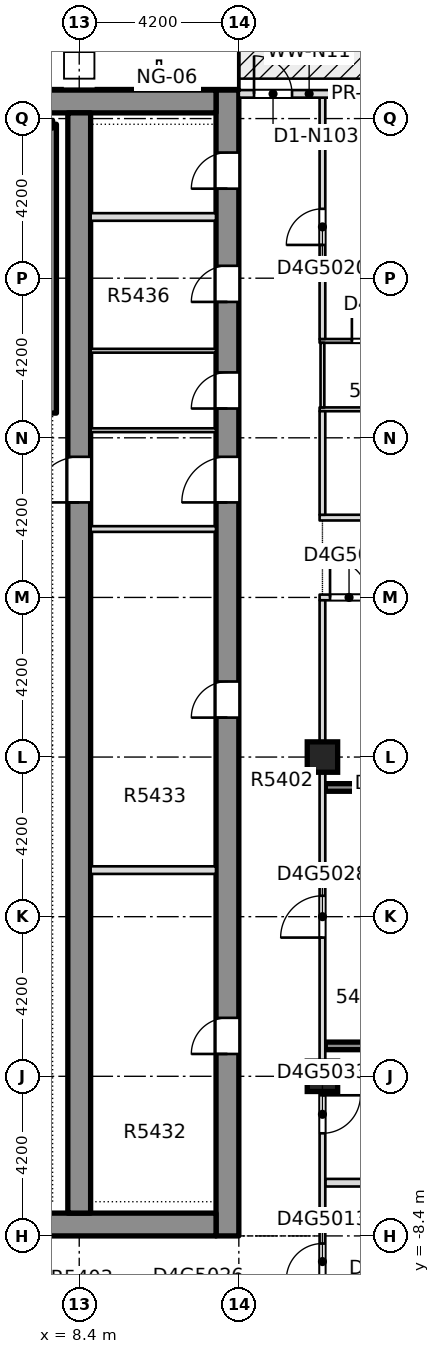
"""IFC4 building model, lengths in metres.
Left out: names, types, materials, properties, quantities, classifications, styles, units other than length and angle.
Written with IfcOpenShell. Run it as: python <this file> out.ifc"""

import sys

from ifc_helpers import new_model, si_unit, direction, frame, frame_2d, origin, origin_2d, place, context, subcontext, project, spatial, rectangle, extrude, element, fill, save


model = new_model("IFC4")
c1 = context("Model", 3, precision=1e-05, world=origin(), true_north=direction((0.0, 1.0)))
c2 = subcontext(c1, "Body", "Model", "MODEL_VIEW")
j1 = project(units=[si_unit("LENGTHUNIT", "METRE"), si_unit("PLANEANGLEUNIT", "RADIAN")], contexts=[c1])
p1 = place(None, origin())
s1 = spatial("IfcSite", under=j1, at=p1, CompositionType="ELEMENT")
p2 = place(p1, origin())
s2 = spatial("IfcBuilding", under=s1, at=p2, CompositionType="ELEMENT")
p3 = place(p2, frame((0.0, 0.0, 206.6)))
s3 = spatial("IfcBuildingStorey", under=s2, at=p3, CompositionType="ELEMENT", Elevation=206.6)
p4 = place(p3, frame((12.3, -8.4, -0.4), z_axis=(0.0, 0.0, 1.0), x_axis=(0.0, 1.0, 0.0)))
e1 = element("IfcWall", 1, at=p4, inside=s3, PredefinedType="SHEAR", context=c2, shape_type="SweptSolid", body=[
    extrude(rectangle(XDim=30.15, YDim=0.6, at=frame_2d((15.075, 0.0))), origin(), (0.0, 0.0, 1.0), 3.45),
])
p5 = place(p4, frame((4.788, 0.0, 0.4)))
e2 = element("IfcOpeningElement", 2, at=p5, cuts=e1, PredefinedType="OPENING", context=c2, shape_type="SweptSolid", body=[
    extrude(rectangle(XDim=0.95, YDim=2.1, at=frame_2d((0.475, 1.05))), frame((0.0, 0.31, 0.0), z_axis=(0.0, -1.0, 0.0), x_axis=(1.0, 0.0, 0.0)), (0.0, 0.0, 1.0), 0.62),
])
p6 = place(p4, frame((13.638, 0.0, 0.4)))
e3 = element("IfcOpeningElement", 3, at=p6, cuts=e1, PredefinedType="OPENING", context=c2, shape_type="SweptSolid", body=[
    extrude(rectangle(XDim=0.95, YDim=2.1, at=frame_2d((0.475, 1.05))), frame((0.0, 0.31, 0.0), z_axis=(0.0, -1.0, 0.0), x_axis=(1.0, 0.0, 0.0)), (0.0, 0.0, 1.0), 0.62),
])
p7 = place(p4, frame((21.771, 0.0, 0.4)))
e4 = element("IfcOpeningElement", 4, at=p7, cuts=e1, PredefinedType="OPENING", context=c2, shape_type="SweptSolid", body=[
    extrude(rectangle(XDim=0.95, YDim=2.1, at=frame_2d((0.475, 1.05))), frame((0.0, 0.31, 0.0), z_axis=(0.0, -1.0, 0.0), x_axis=(1.0, 0.0, 0.0)), (0.0, 0.0, 1.0), 0.62),
])
p8 = place(p4, frame((24.576, 0.0, 0.4)))
e5 = element("IfcOpeningElement", 5, at=p8, cuts=e1, PredefinedType="OPENING", context=c2, shape_type="SweptSolid", body=[
    extrude(rectangle(XDim=0.95, YDim=2.1, at=frame_2d((0.475, 1.05))), frame((0.0, 0.31, 0.0), z_axis=(0.0, -1.0, 0.0), x_axis=(1.0, 0.0, 0.0)), (0.0, 0.0, 1.0), 0.62),
])
p9 = place(p4, frame((27.555, 0.0, 0.4)))
e6 = element("IfcOpeningElement", 6, at=p9, cuts=e1, PredefinedType="OPENING", context=c2, shape_type="SweptSolid", body=[
    extrude(rectangle(XDim=0.95, YDim=2.1, at=frame_2d((0.475, 1.05))), frame((0.0, 0.31, 0.0), z_axis=(0.0, -1.0, 0.0), x_axis=(1.0, 0.0, 0.0)), (0.0, 0.0, 1.0), 0.62),
])
p10 = place(p4, frame((19.3, 0.0, 0.4)))
e7 = element("IfcOpeningElement", 7, at=p10, cuts=e1, PredefinedType="OPENING", context=c2, shape_type="SweptSolid", body=[
    extrude(rectangle(XDim=1.2, YDim=2.1, at=frame_2d((0.6, 1.05))), frame((0.0, 0.31, 0.0), z_axis=(0.0, -1.0, 0.0), x_axis=(1.0, 0.0, 0.0)), (0.0, 0.0, 1.0), 0.62),
])
p11 = place(p3, frame((-12.0, -8.1, -0.4), z_axis=(0.0, 0.0, 1.0), x_axis=(1.0, 0.0, 0.0)))
e8 = element("IfcWall", 8, at=p11, inside=s3, PredefinedType="SHEAR", context=c2, shape_type="SweptSolid", body=[
    extrude(rectangle(XDim=24.0, YDim=0.6, at=frame_2d((12.0, 0.0))), origin(), (0.0, 0.0, 1.0), 3.45),
])
p12 = place(p11, frame((7.25, 0.0, 0.4)))
e9 = element("IfcOpeningElement", 9, at=p12, cuts=e8, PredefinedType="OPENING", context=c2, shape_type="SweptSolid", body=[
    extrude(rectangle(XDim=1.8, YDim=2.1, at=frame_2d((0.9, 1.05))), frame((0.0, 0.31, 0.0), z_axis=(0.0, -1.0, 0.0), x_axis=(1.0, 0.0, 0.0)), (0.0, 0.0, 1.0), 0.62),
])
p13 = place(p11, frame((14.95, 0.0, 0.4)))
e10 = element("IfcOpeningElement", 10, at=p13, cuts=e8, PredefinedType="OPENING", context=c2, shape_type="SweptSolid", body=[
    extrude(rectangle(XDim=1.8, YDim=2.1, at=frame_2d((0.9, 1.05))), frame((0.0, 0.31, 0.0), z_axis=(0.0, -1.0, 0.0), x_axis=(1.0, 0.0, 0.0)), (0.0, 0.0, 1.0), 0.62),
])
p14 = place(p3, frame((-12.0, 21.45, -0.4), z_axis=(0.0, 0.0, 1.0), x_axis=(1.0, 0.0, 0.0)))
e11 = element("IfcWall", 11, at=p14, inside=s3, PredefinedType="SHEAR", context=c2, shape_type="SweptSolid", body=[
    extrude(rectangle(XDim=24.0, YDim=0.6, at=frame_2d((12.0, 0.0))), origin(), (0.0, 0.0, 1.0), 3.45),
])
p15 = place(p3, frame((8.4, -7.8, -0.4), z_axis=(0.0, 0.0, 1.0), x_axis=(0.0, 1.0, 0.0)))
e12 = element("IfcWall", 12, at=p15, inside=s3, PredefinedType="SHEAR", context=c2, shape_type="SweptSolid", body=[
    extrude(rectangle(XDim=28.95, YDim=0.6, at=frame_2d((14.475, 0.0))), origin(), (0.0, 0.0, 1.0), 3.45),
])
p16 = place(p15, frame((18.7, 0.0, 0.4)))
e13 = element("IfcOpeningElement", 13, at=p16, cuts=e12, PredefinedType="OPENING", context=c2, shape_type="SweptSolid", body=[
    extrude(rectangle(XDim=1.2, YDim=2.1, at=frame_2d((0.6, 1.05))), frame((0.0, 0.31, 0.0), z_axis=(0.0, -1.0, 0.0), x_axis=(1.0, 0.0, 0.0)), (0.0, 0.0, 1.0), 0.62),
])
for number, where, z_axis, x_axis in (
    (14, (14.8, -4.2, -0.4), (0.0, 0.0, 1.0), (1.0, 0.0, 0.0)),
    (15, (14.8, 4.2, -0.4), (0.0, 0.0, 1.0), (1.0, 0.0, 0.0)),
):
    element("IfcColumn", number, at=place(p3, frame(where, z_axis=z_axis, x_axis=x_axis)), inside=s3, PredefinedType="COLUMN", context=c2, shape_type="SweptSolid", body=[
        extrude(rectangle(XDim=0.8, YDim=0.8, at=origin_2d()), origin(), (0.0, 0.0, 1.0), 3.45),
    ])
p17 = place(p3, frame((14.875, -7.0, 0.0), z_axis=(0.0, 0.0, 1.0), x_axis=(1.0, 0.0, 0.0)))
e16 = element("IfcWall", 16, at=p17, inside=s3, PredefinedType="PARTITIONING", context=c2, shape_type="SweptSolid", body=[
    extrude(rectangle(XDim=10.875, YDim=0.2, at=frame_2d((5.438, 0.0))), origin(), (0.0, 0.0, 1.0), 3.05),
])
p18 = place(p3, frame((14.875, -3.4, 0.0), z_axis=(0.0, 0.0, 1.0), x_axis=(1.0, 0.0, 0.0)))
e17 = element("IfcWall", 17, at=p18, inside=s3, PredefinedType="SOLIDWALL", context=c2, shape_type="SweptSolid", body=[
    extrude(rectangle(XDim=5.525, YDim=0.2, at=frame_2d((2.762, 0.0))), origin(), (0.0, 0.0, 1.0), 3.05),
])
p19 = place(p3, frame((14.725, 8.4, 0.0), z_axis=(0.0, 0.0, 1.0), x_axis=(1.0, 0.0, 0.0)))
e18 = element("IfcWall", 18, at=p19, inside=s3, PredefinedType="PARTITIONING", context=c2, shape_type="SweptSolid", body=[
    extrude(rectangle(XDim=11.025, YDim=0.15, at=frame_2d((5.512, 0.0))), origin(), (0.0, 0.0, 1.0), 3.05),
])
p20 = place(p19, frame((0.275, 0.0, 0.0)))
e19 = element("IfcOpeningElement", 19, at=p20, cuts=e18, PredefinedType="OPENING", context=c2, shape_type="SweptSolid", body=[
    extrude(rectangle(XDim=1.0, YDim=2.1, at=frame_2d((0.5, 1.05))), frame((0.0, 0.085, 0.0), z_axis=(0.0, -1.0, 0.0), x_axis=(1.0, 0.0, 0.0)), (0.0, 0.0, 1.0), 0.17),
])
p21 = place(p3, frame((14.725, 10.5, 0.0), z_axis=(0.0, 0.0, 1.0), x_axis=(1.0, 0.0, 0.0)))
e20 = element("IfcWall", 20, at=p21, inside=s3, PredefinedType="PARTITIONING", context=c2, shape_type="SweptSolid", body=[
    extrude(rectangle(XDim=11.025, YDim=0.15, at=frame_2d((5.512, 0.0))), origin(), (0.0, 0.0, 1.0), 3.05),
])
p22 = place(p21, frame((5.15, 0.0, 0.0)))
e21 = element("IfcOpeningElement", 21, at=p22, cuts=e20, PredefinedType="OPENING", context=c2, shape_type="SweptSolid", body=[
    extrude(rectangle(XDim=1.0, YDim=2.1, at=frame_2d((0.5, 1.05))), frame((0.0, 0.085, 0.0), z_axis=(0.0, -1.0, 0.0), x_axis=(1.0, 0.0, 0.0)), (0.0, 0.0, 1.0), 0.17),
])
p23 = place(p3, frame((14.725, 13.35, 0.0), z_axis=(0.0, 0.0, 1.0), x_axis=(1.0, 0.0, 0.0)))
e22 = element("IfcWall", 22, at=p23, inside=s3, PredefinedType="PARTITIONING", context=c2, shape_type="SweptSolid", body=[
    extrude(rectangle(XDim=2.525, YDim=0.1, at=frame_2d((1.262, 0.0))), origin(), (0.0, 0.0, 1.0), 3.05),
])
p24 = place(p3, frame((14.725, 15.15, 0.0), z_axis=(0.0, 0.0, 1.0), x_axis=(1.0, 0.0, 0.0)))
e23 = element("IfcWall", 23, at=p24, inside=s3, PredefinedType="PARTITIONING", context=c2, shape_type="SweptSolid", body=[
    extrude(rectangle(XDim=2.525, YDim=0.1, at=frame_2d((1.262, 0.0))), origin(), (0.0, 0.0, 1.0), 3.05),
])
p25 = place(p24, frame((0.85, 0.0, 0.0)))
e24 = element("IfcOpeningElement", 24, at=p25, cuts=e23, PredefinedType="OPENING", context=c2, shape_type="SweptSolid", body=[
    extrude(rectangle(XDim=0.85, YDim=2.1, at=frame_2d((0.425, 1.05))), frame((0.0, 0.06, 0.0), z_axis=(0.0, -1.0, 0.0), x_axis=(1.0, 0.0, 0.0)), (0.0, 0.0, 1.0), 0.12),
])
p26 = place(p3, frame((14.8, -10.18, 0.0), z_axis=(0.0, 0.0, 1.0), x_axis=(0.0, 1.0, 0.0)))
e25 = element("IfcWall", 25, at=p26, inside=s3, PredefinedType="PARTITIONING", context=c2, shape_type="SweptSolid", body=[
    extrude(rectangle(XDim=18.505, YDim=0.15, at=frame_2d((9.252, 0.0))), origin(), (0.0, 0.0, 1.0), 3.05),
])
p27 = place(p26, frame((0.63, 0.0, 0.0)))
e26 = element("IfcOpeningElement", 26, at=p27, cuts=e25, PredefinedType="OPENING", context=c2, shape_type="SweptSolid", body=[
    extrude(rectangle(XDim=0.95, YDim=2.1, at=frame_2d((0.475, 1.05))), frame((0.0, 0.085, 0.0), z_axis=(0.0, -1.0, 0.0), x_axis=(1.0, 0.0, 0.0)), (0.0, 0.0, 1.0), 0.17),
])
p28 = place(p26, frame((9.63, 0.0, 0.0)))
e27 = element("IfcOpeningElement", 27, at=p28, cuts=e25, PredefinedType="OPENING", context=c2, shape_type="SweptSolid", body=[
    extrude(rectangle(XDim=1.1, YDim=2.1, at=frame_2d((0.55, 1.05))), frame((0.0, 0.085, 0.0), z_axis=(0.0, -1.0, 0.0), x_axis=(1.0, 0.0, 0.0)), (0.0, 0.0, 1.0), 0.17),
])
p29 = place(p26, frame((4.48, 0.0, 0.0)))
e28 = element("IfcOpeningElement", 28, at=p29, cuts=e25, PredefinedType="OPENING", context=c2, shape_type="SweptSolid", body=[
    extrude(rectangle(XDim=1.0, YDim=2.1, at=frame_2d((0.5, 1.05))), frame((0.0, 0.085, 0.0), z_axis=(0.0, -1.0, 0.0), x_axis=(1.0, 0.0, 0.0)), (0.0, 0.0, 1.0), 0.17),
])
p30 = place(p3, frame((14.8, 10.575, 0.0), z_axis=(0.0, 0.0, 1.0), x_axis=(0.0, 1.0, 0.0)))
e29 = element("IfcWall", 29, at=p30, inside=s3, PredefinedType="PARTITIONING", context=c2, shape_type="SweptSolid", body=[
    extrude(rectangle(XDim=2.725, YDim=0.15, at=frame_2d((1.363, 0.0))), origin(), (0.0, 0.0, 1.0), 3.05),
])
p31 = place(p3, frame((14.8, 13.4, 0.0), z_axis=(0.0, 0.0, 1.0), x_axis=(0.0, 1.0, 0.0)))
e30 = element("IfcWall", 30, at=p31, inside=s3, PredefinedType="PARTITIONING", context=c2, shape_type="SweptSolid", body=[
    extrude(rectangle(XDim=1.7, YDim=0.1, at=frame_2d((0.85, 0.0))), origin(), (0.0, 0.0, 1.0), 3.05),
])
p32 = place(p3, frame((14.8, 15.2, 0.0), z_axis=(0.0, 0.0, 1.0), x_axis=(0.0, 1.0, 0.0)))
e31 = element("IfcWall", 31, at=p32, inside=s3, PredefinedType="PARTITIONING", context=c2, shape_type="SweptSolid", body=[
    extrude(rectangle(XDim=6.35, YDim=0.15, at=frame_2d((3.175, 0.0))), origin(), (0.0, 0.0, 1.0), 3.05),
])
p33 = place(p32, frame((2.475, 0.0, 0.0)))
e32 = element("IfcOpeningElement", 32, at=p33, cuts=e31, PredefinedType="OPENING", context=c2, shape_type="SweptSolid", body=[
    extrude(rectangle(XDim=0.95, YDim=2.1, at=frame_2d((0.475, 1.05))), frame((0.0, 0.085, 0.0), z_axis=(0.0, -1.0, 0.0), x_axis=(1.0, 0.0, 0.0)), (0.0, 0.0, 1.0), 0.17),
])
p34 = place(p3, frame((16.3, 21.65, 0.0), z_axis=(0.0, 0.0, 1.0), x_axis=(-1.0, 0.0, 0.0)))
e33 = element("IfcWall", 33, at=p34, inside=s3, PredefinedType="STANDARD", context=c2, shape_type="SweptSolid", body=[
    extrude(rectangle(XDim=3.7, YDim=0.2, at=frame_2d((1.85, 0.0))), origin(), (0.0, 0.0, 1.0), 3.05),
])
p35 = place(p34, frame((2.3, 0.0, 0.0)))
e34 = element("IfcOpeningElement", 34, at=p35, cuts=e33, PredefinedType="OPENING", context=c2, shape_type="SweptSolid", body=[
    extrude(rectangle(XDim=1.0, YDim=2.4, at=frame_2d((0.5, 1.2))), frame((0.0, 0.11, 0.0), z_axis=(0.0, -1.0, 0.0), x_axis=(1.0, 0.0, 0.0)), (0.0, 0.0, 1.0), 0.22),
])
p36 = place(p3, frame((8.701, 1.225, 0.0), z_axis=(0.0, 0.0, 1.0), x_axis=(1.0, 0.0, 0.0)))
e35 = element("IfcWall", 35, at=p36, inside=s3, PredefinedType="PARTITIONING", context=c2, shape_type="SweptSolid", body=[
    extrude(rectangle(XDim=3.298, YDim=0.2, at=frame_2d((1.649, 0.0))), origin(), (0.0, 0.0, 1.0), 3.05),
])
p37 = place(p3, frame((8.701, 10.2, 0.0), z_axis=(0.0, 0.0, 1.0), x_axis=(1.0, 0.0, 0.0)))
e36 = element("IfcWall", 36, at=p37, inside=s3, PredefinedType="PARTITIONING", context=c2, shape_type="SweptSolid", body=[
    extrude(rectangle(XDim=3.298, YDim=0.15, at=frame_2d((1.649, 0.0))), origin(), (0.0, 0.0, 1.0), 3.05),
])
for number, where, z_axis, x_axis in (
    (37, (8.701, 12.8, 0.0), (0.0, 0.0, 1.0), (1.0, 0.0, 0.0)),
    (38, (8.701, 14.891, 0.0), (0.0, 0.0, 1.0), (1.0, 0.0, 0.0)),
):
    element("IfcWall", number, at=place(p3, frame(where, z_axis=z_axis, x_axis=x_axis)), inside=s3, PredefinedType="PARTITIONING", context=c2, shape_type="SweptSolid", body=[
        extrude(rectangle(XDim=3.298, YDim=0.1, at=frame_2d((1.649, 0.0))), origin(), (0.0, 0.0, 1.0), 3.05),
    ])
p38 = place(p3, frame((8.701, 18.411, 0.0), z_axis=(0.0, 0.0, 1.0), x_axis=(1.0, 0.0, 0.0)))
e39 = element("IfcWall", 39, at=p38, inside=s3, PredefinedType="PARTITIONING", context=c2, shape_type="SweptSolid", body=[
    extrude(rectangle(XDim=3.298, YDim=0.2, at=frame_2d((1.649, 0.0))), origin(), (0.0, 0.0, 1.0), 3.05),
])
p39 = place(p3, frame((7.7, 13.25, 0.0), z_axis=(0.0, 0.0, 1.0), x_axis=(0.0, 1.0, 0.0)))
e40 = element("IfcWall", 40, at=p39, inside=s3, PredefinedType="SOLIDWALL", context=c2, shape_type="SweptSolid", body=[
    extrude(rectangle(XDim=7.6, YDim=0.2, at=frame_2d((3.8, 0.0))), origin(), (0.0, 0.0, 1.0), 3.05),
])
p40 = place(p3, frame((14.875, 3.4, 0.0), z_axis=(0.0, 0.0, 1.0), x_axis=(1.0, 0.0, 0.0)))
e41 = element("IfcWall", 41, at=p40, inside=s3, PredefinedType="SOLIDWALL", context=c2, shape_type="SweptSolid", body=[
    extrude(rectangle(XDim=5.575, YDim=0.2, at=frame_2d((2.788, 0.0))), origin(), (0.0, 0.0, 1.0), 3.05),
])
p41 = place(p27, origin())
e42 = element("IfcDoor", 42, at=p41, inside=s3, OperationType="SINGLE_SWING_RIGHT", PredefinedType="DOOR", context=c2, shape_type="SweptSolid", body=[
    extrude(rectangle(XDim=0.95, YDim=2.1, at=frame_2d((0.475, 1.05))), frame((0.0, 0.025, 0.0), z_axis=(0.0, -1.0, 0.0), x_axis=(1.0, 0.0, 0.0)), (0.0, 0.0, 1.0), 0.05),
])
fill(e26, e42)
p42 = place(p20, origin())
e43 = element("IfcDoor", 43, at=p42, inside=s3, OperationType="SINGLE_SWING_RIGHT", PredefinedType="DOOR", context=c2, shape_type="SweptSolid", body=[
    extrude(rectangle(XDim=1.0, YDim=2.1, at=frame_2d((0.5, 1.05))), frame((0.0, 0.025, 0.0), z_axis=(0.0, -1.0, 0.0), x_axis=(1.0, 0.0, 0.0)), (0.0, 0.0, 1.0), 0.05),
])
fill(e19, e43)
p43 = place(p33, origin())
e44 = element("IfcDoor", 44, at=p43, inside=s3, OperationType="SINGLE_SWING_LEFT", PredefinedType="DOOR", context=c2, shape_type="SweptSolid", body=[
    extrude(rectangle(XDim=0.95, YDim=2.1, at=frame_2d((0.475, 1.05))), frame((0.0, 0.025, 0.0), z_axis=(0.0, -1.0, 0.0), x_axis=(1.0, 0.0, 0.0)), (0.0, 0.0, 1.0), 0.05),
])
fill(e32, e44)
p44 = place(p25, origin())
e45 = element("IfcDoor", 45, at=p44, inside=s3, OperationType="SINGLE_SWING_RIGHT", PredefinedType="DOOR", context=c2, shape_type="SweptSolid", body=[
    extrude(rectangle(XDim=0.85, YDim=2.1, at=frame_2d((0.425, 1.05))), frame((0.0, 0.025, 0.0), z_axis=(0.0, -1.0, 0.0), x_axis=(1.0, 0.0, 0.0)), (0.0, 0.0, 1.0), 0.05),
])
fill(e24, e45)
p45 = place(p28, origin())
e46 = element("IfcDoor", 46, at=p45, inside=s3, OperationType="SINGLE_SWING_LEFT", PredefinedType="DOOR", context=c2, shape_type="SweptSolid", body=[
    extrude(rectangle(XDim=1.1, YDim=2.1, at=frame_2d((0.55, 1.05))), frame((0.0, 0.025, 0.0), z_axis=(0.0, -1.0, 0.0), x_axis=(1.0, 0.0, 0.0)), (0.0, 0.0, 1.0), 0.05),
])
fill(e27, e46)
p46 = place(p29, origin())
e47 = element("IfcDoor", 47, at=p46, inside=s3, OperationType="SINGLE_SWING_RIGHT", PredefinedType="DOOR", context=c2, shape_type="SweptSolid", body=[
    extrude(rectangle(XDim=1.0, YDim=2.1, at=frame_2d((0.5, 1.05))), frame((0.0, 0.025, 0.0), z_axis=(0.0, -1.0, 0.0), x_axis=(1.0, 0.0, 0.0)), (0.0, 0.0, 1.0), 0.05),
])
fill(e28, e47)
p47 = place(p35, origin())
e48 = element("IfcDoor", 48, at=p47, inside=s3, OperationType="SINGLE_SWING_LEFT", PredefinedType="DOOR", context=c2, shape_type="SweptSolid", body=[
    extrude(rectangle(XDim=1.0, YDim=2.4, at=frame_2d((0.5, 1.2))), frame((0.0, 0.025, 0.0), z_axis=(0.0, -1.0, 0.0), x_axis=(1.0, 0.0, 0.0)), (0.0, 0.0, 1.0), 0.05),
])
fill(e34, e48)
p48 = place(p5, origin())
e49 = element("IfcDoor", 49, at=p48, inside=s3, OperationType="SINGLE_SWING_LEFT", PredefinedType="DOOR", context=c2, shape_type="SweptSolid", body=[
    extrude(rectangle(XDim=0.95, YDim=2.1, at=frame_2d((0.475, 1.05))), frame((0.0, 0.025, 0.0), z_axis=(0.0, -1.0, 0.0), x_axis=(1.0, 0.0, 0.0)), (0.0, 0.0, 1.0), 0.05),
])
fill(e2, e49)
p49 = place(p6, origin())
e50 = element("IfcDoor", 50, at=p49, inside=s3, OperationType="SINGLE_SWING_LEFT", PredefinedType="DOOR", context=c2, shape_type="SweptSolid", body=[
    extrude(rectangle(XDim=0.95, YDim=2.1, at=frame_2d((0.475, 1.05))), frame((0.0, 0.025, 0.0), z_axis=(0.0, -1.0, 0.0), x_axis=(1.0, 0.0, 0.0)), (0.0, 0.0, 1.0), 0.05),
])
fill(e3, e50)
p50 = place(p7, origin())
e51 = element("IfcDoor", 51, at=p50, inside=s3, OperationType="SINGLE_SWING_LEFT", PredefinedType="DOOR", context=c2, shape_type="SweptSolid", body=[
    extrude(rectangle(XDim=0.95, YDim=2.1, at=frame_2d((0.475, 1.05))), frame((0.0, 0.025, 0.0), z_axis=(0.0, -1.0, 0.0), x_axis=(1.0, 0.0, 0.0)), (0.0, 0.0, 1.0), 0.05),
])
fill(e4, e51)
p51 = place(p8, origin())
e52 = element("IfcDoor", 52, at=p51, inside=s3, OperationType="SINGLE_SWING_LEFT", PredefinedType="DOOR", context=c2, shape_type="SweptSolid", body=[
    extrude(rectangle(XDim=0.95, YDim=2.1, at=frame_2d((0.475, 1.05))), frame((0.0, 0.025, 0.0), z_axis=(0.0, -1.0, 0.0), x_axis=(1.0, 0.0, 0.0)), (0.0, 0.0, 1.0), 0.05),
])
fill(e5, e52)
p52 = place(p9, origin())
e53 = element("IfcDoor", 53, at=p52, inside=s3, OperationType="SINGLE_SWING_LEFT", PredefinedType="DOOR", context=c2, shape_type="SweptSolid", body=[
    extrude(rectangle(XDim=0.95, YDim=2.1, at=frame_2d((0.475, 1.05))), frame((0.0, 0.025, 0.0), z_axis=(0.0, -1.0, 0.0), x_axis=(1.0, 0.0, 0.0)), (0.0, 0.0, 1.0), 0.05),
])
fill(e6, e53)
p53 = place(p10, origin())
e54 = element("IfcDoor", 54, at=p53, inside=s3, OperationType="SINGLE_SWING_LEFT", PredefinedType="DOOR", context=c2, shape_type="SweptSolid", body=[
    extrude(rectangle(XDim=1.2, YDim=2.1, at=frame_2d((0.6, 1.05))), frame((0.0, 0.025, 0.0), z_axis=(0.0, -1.0, 0.0), x_axis=(1.0, 0.0, 0.0)), (0.0, 0.0, 1.0), 0.05),
])
fill(e7, e54)
p54 = place(p16, origin())
e55 = element("IfcDoor", 55, at=p54, inside=s3, OperationType="SINGLE_SWING_LEFT", PredefinedType="DOOR", context=c2, shape_type="SweptSolid", body=[
    extrude(rectangle(XDim=1.2, YDim=2.1, at=frame_2d((0.6, 1.05))), frame((0.0, 0.025, 0.0), z_axis=(0.0, -1.0, 0.0), x_axis=(1.0, 0.0, 0.0)), (0.0, 0.0, 1.0), 0.05),
])
fill(e13, e55)
save(model, sys.argv[1])
